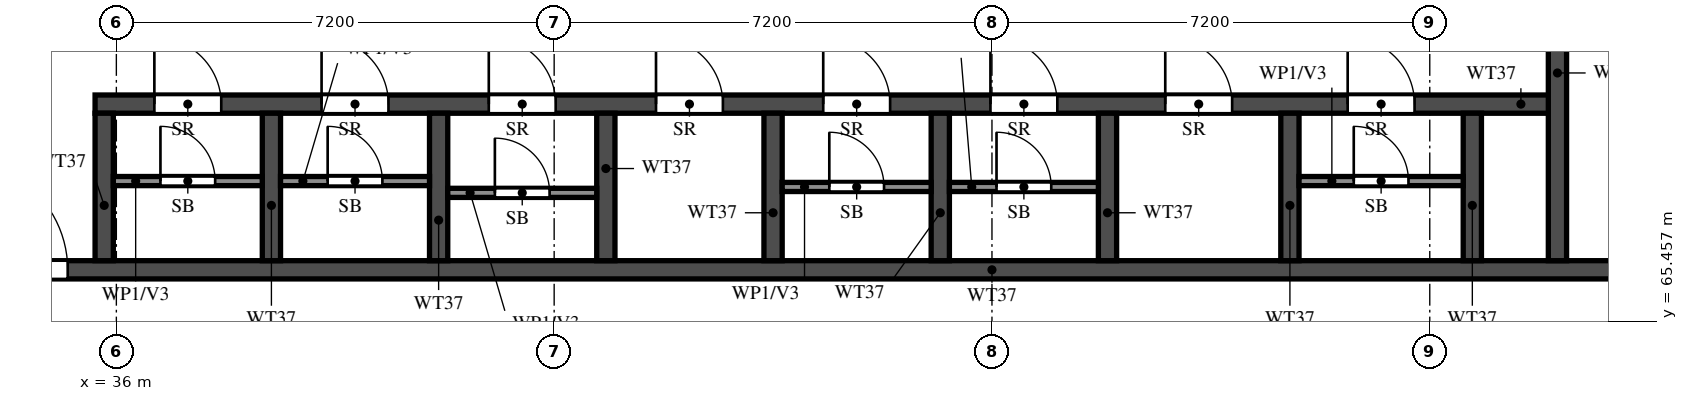
"""IFC4 building model, lengths in metres.
Left out: names, types, materials, properties, quantities, classifications, styles, units other than length and angle.
Written with IfcOpenShell. Run it as: python <this file> out.ifc"""

import sys

from ifc_helpers import new_model, si_unit, direction, frame, frame_2d, origin, place, context, subcontext, project, spatial, rectangle, extrude, element, fill, save


model = new_model("IFC4")
c1 = context("Model", 3, precision=1e-05, world=origin(), true_north=direction((0.0, 1.0)))
c2 = subcontext(c1, "Body", "Model", "MODEL_VIEW")
j1 = project(units=[si_unit("LENGTHUNIT", "METRE"), si_unit("PLANEANGLEUNIT", "RADIAN")], contexts=[c1])
p1 = place(None, origin())
s1 = spatial("IfcSite", under=j1, at=p1, CompositionType="ELEMENT")
p2 = place(p1, origin())
s2 = spatial("IfcBuilding", under=s1, at=p2, CompositionType="ELEMENT")
p3 = place(p2, frame((0.0, 0.0, 246.5)))
s3 = spatial("IfcBuildingStorey", under=s2, at=p3, CompositionType="ELEMENT", Elevation=246.5)
p4 = place(p3, frame((29.2, 66.3, 0.0), z_axis=(0.0, 0.0, 1.0), x_axis=(1.0, 0.0, 0.0)))
e1 = element("IfcWall", 1, at=p4, inside=s3, PredefinedType="SHEAR", context=c2, shape_type="SweptSolid", body=[
    extrude(rectangle(XDim=42.4, YDim=0.3, at=frame_2d((21.2, 0.0))), origin(), (0.0, 0.0, 1.0), 3.22),
])
p5 = place(p4, frame((1.425, 0.0, 0.0)))
e2 = element("IfcOpeningElement", 2, at=p5, cuts=e1, PredefinedType="OPENING", context=c2, shape_type="SweptSolid", body=[
    extrude(rectangle(XDim=1.1, YDim=2.1, at=frame_2d((0.55, 1.05))), frame((0.0, 0.16, 0.0), z_axis=(0.0, -1.0, 0.0), x_axis=(1.0, 0.0, 0.0)), (0.0, 0.0, 1.0), 0.32),
])
p6 = place(p4, frame((4.2, 0.0, 0.0)))
e3 = element("IfcOpeningElement", 3, at=p6, cuts=e1, PredefinedType="OPENING", context=c2, shape_type="SweptSolid", body=[
    extrude(rectangle(XDim=1.8, YDim=2.1, at=frame_2d((0.9, 1.05))), frame((0.0, 0.16, 0.0), z_axis=(0.0, -1.0, 0.0), x_axis=(1.0, 0.0, 0.0)), (0.0, 0.0, 1.0), 0.32),
])
p7 = place(p3, frame((35.65, 69.025, 0.0), z_axis=(0.0, 0.0, 1.0), x_axis=(1.0, 0.0, 0.0)))
e4 = element("IfcWall", 4, at=p7, inside=s3, PredefinedType="SHEAR", context=c2, shape_type="SweptSolid", body=[
    extrude(rectangle(XDim=24.05, YDim=0.3, at=frame_2d((12.025, 0.0))), origin(), (0.0, 0.0, 1.0), 3.22),
])
p8 = place(p7, frame((0.975, 0.0, 0.0)))
e5 = element("IfcOpeningElement", 5, at=p8, cuts=e4, PredefinedType="OPENING", context=c2, shape_type="SweptSolid", body=[
    extrude(rectangle(XDim=1.1, YDim=2.1, at=frame_2d((0.55, 1.05))), frame((0.0, 0.16, 0.0), z_axis=(0.0, -1.0, 0.0), x_axis=(1.0, 0.0, 0.0)), (0.0, 0.0, 1.0), 0.32),
])
p9 = place(p7, frame((3.725, 0.0, 0.0)))
e6 = element("IfcOpeningElement", 6, at=p9, cuts=e4, PredefinedType="OPENING", context=c2, shape_type="SweptSolid", body=[
    extrude(rectangle(XDim=1.1, YDim=2.1, at=frame_2d((0.55, 1.05))), frame((0.0, 0.16, 0.0), z_axis=(0.0, -1.0, 0.0), x_axis=(1.0, 0.0, 0.0)), (0.0, 0.0, 1.0), 0.32),
])
p10 = place(p7, frame((6.475, 0.0, 0.0)))
e7 = element("IfcOpeningElement", 7, at=p10, cuts=e4, PredefinedType="OPENING", context=c2, shape_type="SweptSolid", body=[
    extrude(rectangle(XDim=1.1, YDim=2.1, at=frame_2d((0.55, 1.05))), frame((0.0, 0.16, 0.0), z_axis=(0.0, -1.0, 0.0), x_axis=(1.0, 0.0, 0.0)), (0.0, 0.0, 1.0), 0.32),
])
p11 = place(p7, frame((9.225, 0.0, 0.0)))
e8 = element("IfcOpeningElement", 8, at=p11, cuts=e4, PredefinedType="OPENING", context=c2, shape_type="SweptSolid", body=[
    extrude(rectangle(XDim=1.1, YDim=2.1, at=frame_2d((0.55, 1.05))), frame((0.0, 0.16, 0.0), z_axis=(0.0, -1.0, 0.0), x_axis=(1.0, 0.0, 0.0)), (0.0, 0.0, 1.0), 0.32),
])
p12 = place(p7, frame((11.975, 0.0, 0.0)))
e9 = element("IfcOpeningElement", 9, at=p12, cuts=e4, PredefinedType="OPENING", context=c2, shape_type="SweptSolid", body=[
    extrude(rectangle(XDim=1.1, YDim=2.1, at=frame_2d((0.55, 1.05))), frame((0.0, 0.16, 0.0), z_axis=(0.0, -1.0, 0.0), x_axis=(1.0, 0.0, 0.0)), (0.0, 0.0, 1.0), 0.32),
])
p13 = place(p7, frame((14.725, 0.0, 0.0)))
e10 = element("IfcOpeningElement", 10, at=p13, cuts=e4, PredefinedType="OPENING", context=c2, shape_type="SweptSolid", body=[
    extrude(rectangle(XDim=1.1, YDim=2.1, at=frame_2d((0.55, 1.05))), frame((0.0, 0.16, 0.0), z_axis=(0.0, -1.0, 0.0), x_axis=(1.0, 0.0, 0.0)), (0.0, 0.0, 1.0), 0.32),
])
p14 = place(p7, frame((17.6, 0.0, 0.0)))
e11 = element("IfcOpeningElement", 11, at=p14, cuts=e4, PredefinedType="OPENING", context=c2, shape_type="SweptSolid", body=[
    extrude(rectangle(XDim=1.1, YDim=2.1, at=frame_2d((0.55, 1.05))), frame((0.0, 0.16, 0.0), z_axis=(0.0, -1.0, 0.0), x_axis=(1.0, 0.0, 0.0)), (0.0, 0.0, 1.0), 0.32),
])
p15 = place(p7, frame((20.6, 0.0, 0.0)))
e12 = element("IfcOpeningElement", 12, at=p15, cuts=e4, PredefinedType="OPENING", context=c2, shape_type="SweptSolid", body=[
    extrude(rectangle(XDim=1.1, YDim=2.1, at=frame_2d((0.55, 1.05))), frame((0.0, 0.16, 0.0), z_axis=(0.0, -1.0, 0.0), x_axis=(1.0, 0.0, 0.0)), (0.0, 0.0, 1.0), 0.32),
])
p16 = place(p3, frame((59.7, 66.45, 0.0), z_axis=(0.0, 0.0, 1.0), x_axis=(0.0, 1.0, 0.0)))
e13 = element("IfcWall", 13, at=p16, inside=s3, PredefinedType="SHEAR", context=c2, shape_type="SweptSolid", body=[
    extrude(rectangle(XDim=6.175, YDim=0.3, at=frame_2d((3.087, 0.0))), origin(), (0.0, 0.0, 1.0), 3.22),
])
p17 = place(p16, frame((3.85, 0.0, 0.0)))
e14 = element("IfcOpeningElement", 14, at=p17, cuts=e13, PredefinedType="OPENING", context=c2, shape_type="SweptSolid", body=[
    extrude(rectangle(XDim=1.2, YDim=2.1, at=frame_2d((0.6, 1.05))), frame((0.0, 0.16, 0.0), z_axis=(0.0, -1.0, 0.0), x_axis=(1.0, 0.0, 0.0)), (0.0, 0.0, 1.0), 0.32),
])
for number, where, z_axis, x_axis in (
    (15, (35.8, 66.45, 0.0), (0.0, 0.0, 1.0), (0.0, 1.0, 0.0)),
    (16, (38.55, 66.45, 0.0), (0.0, 0.0, 1.0), (0.0, 1.0, 0.0)),
    (17, (41.3, 66.45, 0.0), (0.0, 0.0, 1.0), (0.0, 1.0, 0.0)),
    (18, (44.05, 66.45, 0.0), (0.0, 0.0, 1.0), (0.0, 1.0, 0.0)),
    (19, (46.8, 66.45, 0.0), (0.0, 0.0, 1.0), (0.0, 1.0, 0.0)),
    (20, (49.55, 66.45, 0.0), (0.0, 0.0, 1.0), (0.0, 1.0, 0.0)),
    (21, (52.3, 66.45, 0.0), (0.0, 0.0, 1.0), (0.0, 1.0, 0.0)),
    (22, (55.3, 66.45, 0.0), (0.0, 0.0, 1.0), (0.0, 1.0, 0.0)),
    (23, (58.3, 66.45, 0.0), (0.0, 0.0, 1.0), (0.0, 1.0, 0.0)),
):
    element("IfcWall", number, at=place(p3, frame(where, z_axis=z_axis, x_axis=x_axis)), inside=s3, PredefinedType="SHEAR", context=c2, shape_type="SweptSolid", body=[
        extrude(rectangle(XDim=2.425, YDim=0.3, at=frame_2d((1.212, 0.0))), origin(), (0.0, 0.0, 1.0), 3.22),
    ])
p18 = place(p3, frame((35.95, 67.76, 0.0), z_axis=(0.0, 0.0, 1.0), x_axis=(1.0, 0.0, 0.0)))
e24 = element("IfcWall", 24, at=p18, inside=s3, PredefinedType="PARTITIONING", context=c2, shape_type="SweptSolid", body=[
    extrude(rectangle(XDim=2.45, YDim=0.15, at=frame_2d((1.225, 0.0))), origin(), (0.0, 0.0, 1.0), 3.22),
])
p19 = place(p18, frame((0.775, 0.0, 0.0)))
e25 = element("IfcOpeningElement", 25, at=p19, cuts=e24, PredefinedType="OPENING", context=c2, shape_type="SweptSolid", body=[
    extrude(rectangle(XDim=0.9, YDim=2.1, at=frame_2d((0.45, 1.05))), frame((0.0, 0.085, 0.0), z_axis=(0.0, -1.0, 0.0), x_axis=(1.0, 0.0, 0.0)), (0.0, 0.0, 1.0), 0.17),
])
p20 = place(p3, frame((38.7, 67.76, 0.0), z_axis=(0.0, 0.0, 1.0), x_axis=(1.0, 0.0, 0.0)))
e26 = element("IfcWall", 26, at=p20, inside=s3, PredefinedType="PARTITIONING", context=c2, shape_type="SweptSolid", body=[
    extrude(rectangle(XDim=2.45, YDim=0.15, at=frame_2d((1.225, 0.0))), origin(), (0.0, 0.0, 1.0), 3.22),
])
p21 = place(p20, frame((0.775, 0.0, 0.0)))
e27 = element("IfcOpeningElement", 27, at=p21, cuts=e26, PredefinedType="OPENING", context=c2, shape_type="SweptSolid", body=[
    extrude(rectangle(XDim=0.9, YDim=2.1, at=frame_2d((0.45, 1.05))), frame((0.0, 0.085, 0.0), z_axis=(0.0, -1.0, 0.0), x_axis=(1.0, 0.0, 0.0)), (0.0, 0.0, 1.0), 0.17),
])
p22 = place(p3, frame((41.45, 67.565, 0.0), z_axis=(0.0, 0.0, 1.0), x_axis=(1.0, 0.0, 0.0)))
e28 = element("IfcWall", 28, at=p22, inside=s3, PredefinedType="PARTITIONING", context=c2, shape_type="SweptSolid", body=[
    extrude(rectangle(XDim=2.45, YDim=0.15, at=frame_2d((1.225, 0.0))), origin(), (0.0, 0.0, 1.0), 3.22),
])
p23 = place(p22, frame((0.775, 0.0, 0.0)))
e29 = element("IfcOpeningElement", 29, at=p23, cuts=e28, PredefinedType="OPENING", context=c2, shape_type="SweptSolid", body=[
    extrude(rectangle(XDim=0.9, YDim=2.1, at=frame_2d((0.45, 1.05))), frame((0.0, 0.085, 0.0), z_axis=(0.0, -1.0, 0.0), x_axis=(1.0, 0.0, 0.0)), (0.0, 0.0, 1.0), 0.17),
])
p24 = place(p3, frame((46.95, 67.663, 0.0), z_axis=(0.0, 0.0, 1.0), x_axis=(1.0, 0.0, 0.0)))
e30 = element("IfcWall", 30, at=p24, inside=s3, PredefinedType="PARTITIONING", context=c2, shape_type="SweptSolid", body=[
    extrude(rectangle(XDim=2.45, YDim=0.15, at=frame_2d((1.225, 0.0))), origin(), (0.0, 0.0, 1.0), 3.22),
])
p25 = place(p24, frame((0.775, 0.0, 0.0)))
e31 = element("IfcOpeningElement", 31, at=p25, cuts=e30, PredefinedType="OPENING", context=c2, shape_type="SweptSolid", body=[
    extrude(rectangle(XDim=0.9, YDim=2.1, at=frame_2d((0.45, 1.05))), frame((0.0, 0.085, 0.0), z_axis=(0.0, -1.0, 0.0), x_axis=(1.0, 0.0, 0.0)), (0.0, 0.0, 1.0), 0.17),
])
p26 = place(p3, frame((49.7, 67.663, 0.0), z_axis=(0.0, 0.0, 1.0), x_axis=(1.0, 0.0, 0.0)))
e32 = element("IfcWall", 32, at=p26, inside=s3, PredefinedType="PARTITIONING", context=c2, shape_type="SweptSolid", body=[
    extrude(rectangle(XDim=2.45, YDim=0.15, at=frame_2d((1.225, 0.0))), origin(), (0.0, 0.0, 1.0), 3.22),
])
p27 = place(p26, frame((0.775, 0.0, 0.0)))
e33 = element("IfcOpeningElement", 33, at=p27, cuts=e32, PredefinedType="OPENING", context=c2, shape_type="SweptSolid", body=[
    extrude(rectangle(XDim=0.9, YDim=2.1, at=frame_2d((0.45, 1.05))), frame((0.0, 0.085, 0.0), z_axis=(0.0, -1.0, 0.0), x_axis=(1.0, 0.0, 0.0)), (0.0, 0.0, 1.0), 0.17),
])
p28 = place(p3, frame((55.45, 67.76, 0.0), z_axis=(0.0, 0.0, 1.0), x_axis=(1.0, 0.0, 0.0)))
e34 = element("IfcWall", 34, at=p28, inside=s3, PredefinedType="PARTITIONING", context=c2, shape_type="SweptSolid", body=[
    extrude(rectangle(XDim=2.7, YDim=0.15, at=frame_2d((1.35, 0.0))), origin(), (0.0, 0.0, 1.0), 3.22),
])
p29 = place(p28, frame((0.9, 0.0, 0.0)))
e35 = element("IfcOpeningElement", 35, at=p29, cuts=e34, PredefinedType="OPENING", context=c2, shape_type="SweptSolid", body=[
    extrude(rectangle(XDim=0.9, YDim=2.1, at=frame_2d((0.45, 1.05))), frame((0.0, 0.085, 0.0), z_axis=(0.0, -1.0, 0.0), x_axis=(1.0, 0.0, 0.0)), (0.0, 0.0, 1.0), 0.17),
])
p30 = place(p6, origin())
e36 = element("IfcDoor", 36, at=p30, inside=s3, OperationType="DOUBLE_DOOR_SINGLE_SWING", PredefinedType="DOOR", context=c2, shape_type="SweptSolid", body=[
    extrude(rectangle(XDim=1.8, YDim=2.1, at=frame_2d((0.9, 1.05))), frame((0.0, 0.025, 0.0), z_axis=(0.0, -1.0, 0.0), x_axis=(1.0, 0.0, 0.0)), (0.0, 0.0, 1.0), 0.05),
])
fill(e3, e36)
p31 = place(p8, origin())
e37 = element("IfcDoor", 37, at=p31, inside=s3, OperationType="SINGLE_SWING_RIGHT", PredefinedType="DOOR", context=c2, shape_type="SweptSolid", body=[
    extrude(rectangle(XDim=1.1, YDim=2.1, at=frame_2d((0.55, 1.05))), frame((0.0, 0.025, 0.0), z_axis=(0.0, -1.0, 0.0), x_axis=(1.0, 0.0, 0.0)), (0.0, 0.0, 1.0), 0.05),
])
fill(e5, e37)
p32 = place(p19, origin())
e38 = element("IfcDoor", 38, at=p32, inside=s3, OperationType="SINGLE_SWING_LEFT", PredefinedType="DOOR", context=c2, shape_type="SweptSolid", body=[
    extrude(rectangle(XDim=0.9, YDim=2.1, at=frame_2d((0.45, 1.05))), frame((0.0, 0.025, 0.0), z_axis=(0.0, -1.0, 0.0), x_axis=(1.0, 0.0, 0.0)), (0.0, 0.0, 1.0), 0.05),
])
fill(e25, e38)
p33 = place(p9, origin())
e39 = element("IfcDoor", 39, at=p33, inside=s3, OperationType="SINGLE_SWING_LEFT", PredefinedType="DOOR", context=c2, shape_type="SweptSolid", body=[
    extrude(rectangle(XDim=1.1, YDim=2.1, at=frame_2d((0.55, 1.05))), frame((0.0, 0.025, 0.0), z_axis=(0.0, -1.0, 0.0), x_axis=(1.0, 0.0, 0.0)), (0.0, 0.0, 1.0), 0.05),
])
fill(e6, e39)
p34 = place(p21, origin())
e40 = element("IfcDoor", 40, at=p34, inside=s3, OperationType="SINGLE_SWING_RIGHT", PredefinedType="DOOR", context=c2, shape_type="SweptSolid", body=[
    extrude(rectangle(XDim=0.9, YDim=2.1, at=frame_2d((0.45, 1.05))), frame((0.0, 0.025, 0.0), z_axis=(0.0, -1.0, 0.0), x_axis=(1.0, 0.0, 0.0)), (0.0, 0.0, 1.0), 0.05),
])
fill(e27, e40)
p35 = place(p10, origin())
e41 = element("IfcDoor", 41, at=p35, inside=s3, OperationType="SINGLE_SWING_RIGHT", PredefinedType="DOOR", context=c2, shape_type="SweptSolid", body=[
    extrude(rectangle(XDim=1.1, YDim=2.1, at=frame_2d((0.55, 1.05))), frame((0.0, 0.025, 0.0), z_axis=(0.0, -1.0, 0.0), x_axis=(1.0, 0.0, 0.0)), (0.0, 0.0, 1.0), 0.05),
])
fill(e7, e41)
p36 = place(p23, origin())
e42 = element("IfcDoor", 42, at=p36, inside=s3, OperationType="SINGLE_SWING_RIGHT", PredefinedType="DOOR", context=c2, shape_type="SweptSolid", body=[
    extrude(rectangle(XDim=0.9, YDim=2.1, at=frame_2d((0.45, 1.05))), frame((0.0, 0.025, 0.0), z_axis=(0.0, -1.0, 0.0), x_axis=(1.0, 0.0, 0.0)), (0.0, 0.0, 1.0), 0.05),
])
fill(e29, e42)
p37 = place(p11, origin())
e43 = element("IfcDoor", 43, at=p37, inside=s3, OperationType="SINGLE_SWING_LEFT", PredefinedType="DOOR", context=c2, shape_type="SweptSolid", body=[
    extrude(rectangle(XDim=1.1, YDim=2.1, at=frame_2d((0.55, 1.05))), frame((0.0, 0.025, 0.0), z_axis=(0.0, -1.0, 0.0), x_axis=(1.0, 0.0, 0.0)), (0.0, 0.0, 1.0), 0.05),
])
fill(e8, e43)
p38 = place(p12, origin())
e44 = element("IfcDoor", 44, at=p38, inside=s3, OperationType="SINGLE_SWING_RIGHT", PredefinedType="DOOR", context=c2, shape_type="SweptSolid", body=[
    extrude(rectangle(XDim=1.1, YDim=2.1, at=frame_2d((0.55, 1.05))), frame((0.0, 0.025, 0.0), z_axis=(0.0, -1.0, 0.0), x_axis=(1.0, 0.0, 0.0)), (0.0, 0.0, 1.0), 0.05),
])
fill(e9, e44)
p39 = place(p25, origin())
e45 = element("IfcDoor", 45, at=p39, inside=s3, OperationType="SINGLE_SWING_RIGHT", PredefinedType="DOOR", context=c2, shape_type="SweptSolid", body=[
    extrude(rectangle(XDim=0.9, YDim=2.1, at=frame_2d((0.45, 1.05))), frame((0.0, 0.025, 0.0), z_axis=(0.0, -1.0, 0.0), x_axis=(1.0, 0.0, 0.0)), (0.0, 0.0, 1.0), 0.05),
])
fill(e31, e45)
p40 = place(p13, origin())
e46 = element("IfcDoor", 46, at=p40, inside=s3, OperationType="SINGLE_SWING_LEFT", PredefinedType="DOOR", context=c2, shape_type="SweptSolid", body=[
    extrude(rectangle(XDim=1.1, YDim=2.1, at=frame_2d((0.55, 1.05))), frame((0.0, 0.025, 0.0), z_axis=(0.0, -1.0, 0.0), x_axis=(1.0, 0.0, 0.0)), (0.0, 0.0, 1.0), 0.05),
])
fill(e10, e46)
p41 = place(p27, origin())
e47 = element("IfcDoor", 47, at=p41, inside=s3, OperationType="SINGLE_SWING_LEFT", PredefinedType="DOOR", context=c2, shape_type="SweptSolid", body=[
    extrude(rectangle(XDim=0.9, YDim=2.1, at=frame_2d((0.45, 1.05))), frame((0.0, 0.025, 0.0), z_axis=(0.0, -1.0, 0.0), x_axis=(1.0, 0.0, 0.0)), (0.0, 0.0, 1.0), 0.05),
])
fill(e33, e47)
p42 = place(p14, origin())
e48 = element("IfcDoor", 48, at=p42, inside=s3, OperationType="SINGLE_SWING_RIGHT", PredefinedType="DOOR", context=c2, shape_type="SweptSolid", body=[
    extrude(rectangle(XDim=1.1, YDim=2.1, at=frame_2d((0.55, 1.05))), frame((0.0, 0.025, 0.0), z_axis=(0.0, -1.0, 0.0), x_axis=(1.0, 0.0, 0.0)), (0.0, 0.0, 1.0), 0.05),
])
fill(e11, e48)
p43 = place(p15, origin())
e49 = element("IfcDoor", 49, at=p43, inside=s3, OperationType="SINGLE_SWING_RIGHT", PredefinedType="DOOR", context=c2, shape_type="SweptSolid", body=[
    extrude(rectangle(XDim=1.1, YDim=2.1, at=frame_2d((0.55, 1.05))), frame((0.0, 0.025, 0.0), z_axis=(0.0, -1.0, 0.0), x_axis=(1.0, 0.0, 0.0)), (0.0, 0.0, 1.0), 0.05),
])
fill(e12, e49)
p44 = place(p29, origin())
e50 = element("IfcDoor", 50, at=p44, inside=s3, OperationType="SINGLE_SWING_LEFT", PredefinedType="DOOR", context=c2, shape_type="SweptSolid", body=[
    extrude(rectangle(XDim=0.9, YDim=2.1, at=frame_2d((0.45, 1.05))), frame((0.0, 0.025, 0.0), z_axis=(0.0, -1.0, 0.0), x_axis=(1.0, 0.0, 0.0)), (0.0, 0.0, 1.0), 0.05),
])
fill(e35, e50)
save(model, sys.argv[1])
